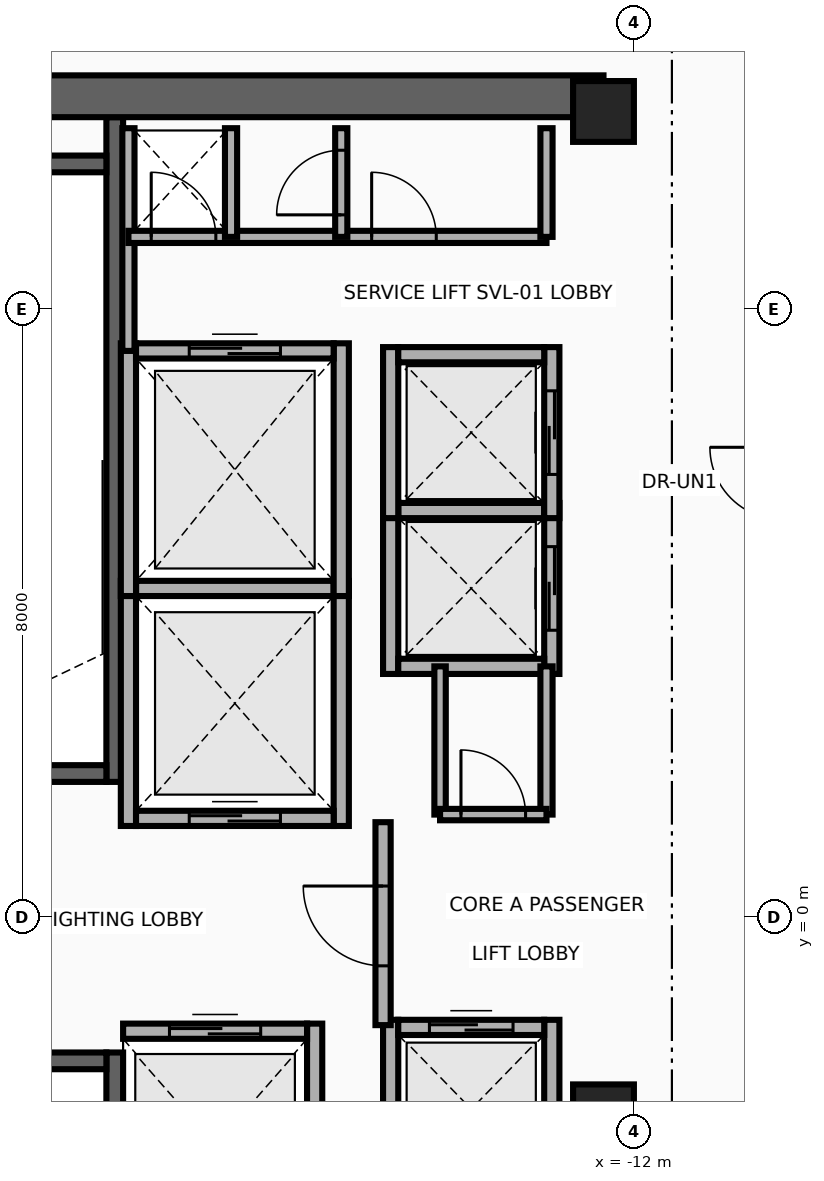
"""IFC4 building model, lengths in metres.
Left out: names, types, materials, properties, quantities, classifications, styles, units other than length and angle.
Written with IfcOpenShell. Run it as: python <this file> out.ifc"""

import sys

from ifc_helpers import new_model, si_unit, direction, frame, frame_2d, origin, origin_2d, place, context, subcontext, project, spatial, rectangle, extrude, source, transform, mapped, element, fill, save


model = new_model("IFC4")
c1 = context("Model", 3, precision=1e-05, world=origin(), true_north=direction((0.0, 1.0)))
c2 = subcontext(c1, "Body", "Model", "MODEL_VIEW")
j1 = project(units=[si_unit("LENGTHUNIT", "METRE"), si_unit("PLANEANGLEUNIT", "RADIAN")], contexts=[c1])
p1 = place(None, origin())
s1 = spatial("IfcSite", under=j1, at=p1, CompositionType="ELEMENT")
p2 = place(p1, origin())
s2 = spatial("IfcBuilding", under=s1, at=p2, CompositionType="ELEMENT")
p3 = place(p2, frame((0.0, 0.0, 269.5)))
s3 = spatial("IfcBuildingStorey", under=s2, at=p3, CompositionType="ELEMENT", Elevation=269.5)
p4 = place(p3, frame((-18.83, 1.78, 0.0), z_axis=(0.0, 0.0, 1.0), x_axis=(0.0, 1.0, 0.0)))
e1 = element("IfcWall", 1, at=p4, inside=s3, PredefinedType="SHEAR", context=c2, shape_type="SweptSolid", body=[
    extrude(rectangle(XDim=8.745, YDim=0.22, at=frame_2d((4.373, 0.0))), origin(), (0.0, 0.0, 1.0), 3.26),
])
p5 = place(p3, frame((-22.05, 1.89, 0.0), z_axis=(0.0, 0.0, 1.0), x_axis=(1.0, 0.0, 0.0)))
e2 = element("IfcWall", 2, at=p5, inside=s3, PredefinedType="SHEAR", context=c2, shape_type="SweptSolid", body=[
    extrude(rectangle(XDim=3.11, YDim=0.22, at=frame_2d((1.555, 0.0))), origin(), (0.0, 0.0, 1.0), 3.26),
])
p6 = place(p5, frame((1.0, 0.0, 0.0)))
e3 = element("IfcOpeningElement", 3, at=p6, cuts=e2, PredefinedType="OPENING", context=c2, shape_type="SweptSolid", body=[
    extrude(rectangle(XDim=1.1, YDim=2.15, at=frame_2d((0.55, 1.075))), frame((0.0, 0.125, 0.0), z_axis=(0.0, -1.0, 0.0), x_axis=(1.0, 0.0, 0.0)), (0.0, 0.0, 1.0), 0.25),
])
p7 = place(p3, frame((-22.05, 9.91, 0.0), z_axis=(0.0, 0.0, 1.0), x_axis=(1.0, 0.0, 0.0)))
e4 = element("IfcWall", 4, at=p7, inside=s3, PredefinedType="SHEAR", context=c2, shape_type="SweptSolid", body=[
    extrude(rectangle(XDim=3.11, YDim=0.22, at=frame_2d((1.555, 0.0))), origin(), (0.0, 0.0, 1.0), 3.26),
])
p8 = place(p3, frame((-18.83, -10.525, 0.0), z_axis=(0.0, 0.0, 1.0), x_axis=(0.0, 1.0, 0.0)))
e5 = element("IfcWall", 5, at=p8, inside=s3, PredefinedType="SHEAR", context=c2, shape_type="SweptSolid", body=[
    extrude(rectangle(XDim=8.745, YDim=0.22, at=frame_2d((4.373, 0.0))), origin(), (0.0, 0.0, 1.0), 3.26),
])
p9 = place(p3, frame((-22.05, -1.89, 0.0), z_axis=(0.0, 0.0, 1.0), x_axis=(1.0, 0.0, 0.0)))
e6 = element("IfcWall", 6, at=p9, inside=s3, PredefinedType="SHEAR", context=c2, shape_type="SweptSolid", body=[
    extrude(rectangle(XDim=3.11, YDim=0.22, at=frame_2d((1.555, 0.0))), origin(), (0.0, 0.0, 1.0), 3.26),
])
p10 = place(p9, frame((1.0, 0.0, 0.0)))
e7 = element("IfcOpeningElement", 7, at=p10, cuts=e6, PredefinedType="OPENING", context=c2, shape_type="SweptSolid", body=[
    extrude(rectangle(XDim=1.1, YDim=2.15, at=frame_2d((0.55, 1.075))), frame((0.0, 0.125, 0.0), z_axis=(0.0, -1.0, 0.0), x_axis=(1.0, 0.0, 0.0)), (0.0, 0.0, 1.0), 0.25),
])
p11 = place(p3, frame((-22.65, 10.8, 0.0), z_axis=(0.0, 0.0, 1.0), x_axis=(1.0, 0.0, 0.0)))
e8 = element("IfcWall", 8, at=p11, inside=s3, PredefinedType="SHEAR", context=c2, shape_type="SweptSolid", body=[
    extrude(rectangle(XDim=10.25, YDim=0.55, at=frame_2d((5.125, 0.0))), origin(), (0.0, 0.0, 1.0), 3.26),
])
m1 = source(origin(), c2, "Body", "SweptSolid", [
    extrude(rectangle(XDim=0.8, YDim=0.8, at=origin_2d()), origin(), (0.0, 0.0, 1.0), 3.5),
])
for number, where, z_axis, x_axis in (
    (9, (-12.4, -2.6, 0.0), (0.0, 0.0, 1.0), (1.0, 0.0, 0.0)),
    (10, (-12.4, 10.6, 0.0), (0.0, 0.0, 1.0), (1.0, 0.0, 0.0)),
):
    element("IfcColumn", number, at=place(p3, frame(where, z_axis=z_axis, x_axis=x_axis)), inside=s3, PredefinedType="COLUMN", context=c2, shape_type="MappedRepresentation", body=[
        mapped(m1, transform((0.0, 0.0, 0.0), x_axis=(1.0, 0.0, 0.0), y_axis=(0.0, 1.0, 0.0), z_axis=(0.0, 0.0, 1.0), scale=1.0)),
    ])
for number, where, z_axis, x_axis in (
    (11, (-18.65, 1.2, 0.0), (0.0, 0.0, 1.0), (0.0, 1.0, 0.0)),
    (12, (-15.85, 1.2, 0.0), (0.0, 0.0, 1.0), (0.0, 1.0, 0.0)),
):
    element("IfcWall", number, at=place(p3, frame(where, z_axis=z_axis, x_axis=x_axis)), inside=s3, PredefinedType="MOVABLE", context=c2, shape_type="SweptSolid", body=[
        extrude(rectangle(XDim=3.225, YDim=0.2, at=frame_2d((1.613, 0.0))), origin(), (0.0, 0.0, 1.0), 3.26),
    ])
p12 = place(p3, frame((-18.55, 1.3, 0.0), z_axis=(0.0, 0.0, 1.0), x_axis=(1.0, 0.0, 0.0)))
e13 = element("IfcWall", 13, at=p12, inside=s3, PredefinedType="MOVABLE", context=c2, shape_type="SweptSolid", body=[
    extrude(rectangle(XDim=2.6, YDim=0.2, at=frame_2d((1.3, 0.0))), origin(), (0.0, 0.0, 1.0), 3.26),
])
p13 = place(p12, frame((0.7, 0.0, 0.0)))
e14 = element("IfcOpeningElement", 14, at=p13, cuts=e13, PredefinedType="OPENING", context=c2, shape_type="SweptSolid", body=[
    extrude(rectangle(XDim=1.2, YDim=2.1, at=frame_2d((0.6, 1.05))), frame((0.0, 0.115, 0.0), z_axis=(0.0, -1.0, 0.0), x_axis=(1.0, 0.0, 0.0)), (0.0, 0.0, 1.0), 0.23),
])
p14 = place(p3, frame((-18.55, 4.325, 0.0), z_axis=(0.0, 0.0, 1.0), x_axis=(1.0, 0.0, 0.0)))
e15 = element("IfcWall", 15, at=p14, inside=s3, PredefinedType="MOVABLE", context=c2, shape_type="SweptSolid", body=[
    extrude(rectangle(XDim=2.6, YDim=0.2, at=frame_2d((1.3, 0.0))), origin(), (0.0, 0.0, 1.0), 3.26),
])
p15 = place(p3, frame((-16.2, -4.6, 0.0), z_axis=(0.0, 0.0, 1.0), x_axis=(0.0, 1.0, 0.0)))
e16 = element("IfcWall", 16, at=p15, inside=s3, PredefinedType="MOVABLE", context=c2, shape_type="SweptSolid", body=[
    extrude(rectangle(XDim=3.2, YDim=0.2, at=frame_2d((1.6, 0.0))), origin(), (0.0, 0.0, 1.0), 3.26),
])
p16 = place(p3, frame((-18.72, -1.5, 0.0), z_axis=(0.0, 0.0, 1.0), x_axis=(1.0, 0.0, 0.0)))
e17 = element("IfcWall", 17, at=p16, inside=s3, PredefinedType="MOVABLE", context=c2, shape_type="SweptSolid", body=[
    extrude(rectangle(XDim=2.42, YDim=0.2, at=frame_2d((1.21, 0.0))), origin(), (0.0, 0.0, 1.0), 3.26),
])
p17 = place(p16, frame((0.61, 0.0, 0.0)))
e18 = element("IfcOpeningElement", 18, at=p17, cuts=e17, PredefinedType="OPENING", context=c2, shape_type="SweptSolid", body=[
    extrude(rectangle(XDim=1.2, YDim=2.1, at=frame_2d((0.6, 1.05))), frame((0.0, 0.115, 0.0), z_axis=(0.0, -1.0, 0.0), x_axis=(1.0, 0.0, 0.0)), (0.0, 0.0, 1.0), 0.23),
])
for number, where, z_axis, x_axis in (
    (19, (-18.65, 4.225, 0.0), (0.0, 0.0, 1.0), (0.0, 1.0, 0.0)),
    (20, (-15.85, 4.225, 0.0), (0.0, 0.0, 1.0), (0.0, 1.0, 0.0)),
):
    element("IfcWall", number, at=place(p3, frame(where, z_axis=z_axis, x_axis=x_axis)), inside=s3, PredefinedType="MOVABLE", context=c2, shape_type="SweptSolid", body=[
        extrude(rectangle(XDim=3.325, YDim=0.2, at=frame_2d((1.663, 0.0))), origin(), (0.0, 0.0, 1.0), 3.26),
    ])
p18 = place(p3, frame((-18.55, 7.45, 0.0), z_axis=(0.0, 0.0, 1.0), x_axis=(1.0, 0.0, 0.0)))
e21 = element("IfcWall", 21, at=p18, inside=s3, PredefinedType="MOVABLE", context=c2, shape_type="SweptSolid", body=[
    extrude(rectangle(XDim=2.6, YDim=0.2, at=frame_2d((1.3, 0.0))), origin(), (0.0, 0.0, 1.0), 3.26),
])
p19 = place(p18, frame((0.7, 0.0, 0.0)))
e22 = element("IfcOpeningElement", 22, at=p19, cuts=e21, PredefinedType="OPENING", context=c2, shape_type="SweptSolid", body=[
    extrude(rectangle(XDim=1.2, YDim=2.1, at=frame_2d((0.6, 1.05))), frame((0.0, 0.115, 0.0), z_axis=(0.0, -1.0, 0.0), x_axis=(1.0, 0.0, 0.0)), (0.0, 0.0, 1.0), 0.23),
])
p20 = place(p3, frame((-15.2, 3.2, 0.0), z_axis=(0.0, 0.0, 1.0), x_axis=(0.0, 1.0, 0.0)))
e23 = element("IfcWall", 23, at=p20, inside=s3, PredefinedType="MOVABLE", context=c2, shape_type="SweptSolid", body=[
    extrude(rectangle(XDim=2.25, YDim=0.2, at=frame_2d((1.125, 0.0))), origin(), (0.0, 0.0, 1.0), 3.26),
])
p21 = place(p3, frame((-13.08, 3.2, 0.0), z_axis=(0.0, 0.0, 1.0), x_axis=(0.0, 1.0, 0.0)))
e24 = element("IfcWall", 24, at=p21, inside=s3, PredefinedType="MOVABLE", context=c2, shape_type="SweptSolid", body=[
    extrude(rectangle(XDim=2.25, YDim=0.2, at=frame_2d((1.125, 0.0))), origin(), (0.0, 0.0, 1.0), 3.26),
])
p22 = place(p21, frame((0.575, 0.0, 0.0)))
e25 = element("IfcOpeningElement", 25, at=p22, cuts=e24, PredefinedType="OPENING", context=c2, shape_type="SweptSolid", body=[
    extrude(rectangle(XDim=1.1, YDim=2.1, at=frame_2d((0.55, 1.05))), frame((0.0, 0.115, 0.0), z_axis=(0.0, -1.0, 0.0), x_axis=(1.0, 0.0, 0.0)), (0.0, 0.0, 1.0), 0.23),
])
for number, where, z_axis, x_axis in (
    (26, (-15.1, 3.3, 0.0), (0.0, 0.0, 1.0), (1.0, 0.0, 0.0)),
    (27, (-15.1, 5.35, 0.0), (0.0, 0.0, 1.0), (1.0, 0.0, 0.0)),
):
    element("IfcWall", number, at=place(p3, frame(where, z_axis=z_axis, x_axis=x_axis)), inside=s3, PredefinedType="MOVABLE", context=c2, shape_type="SweptSolid", body=[
        extrude(rectangle(XDim=1.92, YDim=0.2, at=frame_2d((0.96, 0.0))), origin(), (0.0, 0.0, 1.0), 3.26),
    ])
p23 = place(p3, frame((-15.2, 5.25, 0.0), z_axis=(0.0, 0.0, 1.0), x_axis=(0.0, 1.0, 0.0)))
e28 = element("IfcWall", 28, at=p23, inside=s3, PredefinedType="MOVABLE", context=c2, shape_type="SweptSolid", body=[
    extrude(rectangle(XDim=2.25, YDim=0.2, at=frame_2d((1.125, 0.0))), origin(), (0.0, 0.0, 1.0), 3.26),
])
p24 = place(p3, frame((-13.08, 5.25, 0.0), z_axis=(0.0, 0.0, 1.0), x_axis=(0.0, 1.0, 0.0)))
e29 = element("IfcWall", 29, at=p24, inside=s3, PredefinedType="MOVABLE", context=c2, shape_type="SweptSolid", body=[
    extrude(rectangle(XDim=2.25, YDim=0.2, at=frame_2d((1.125, 0.0))), origin(), (0.0, 0.0, 1.0), 3.26),
])
p25 = place(p24, frame((0.575, 0.0, 0.0)))
e30 = element("IfcOpeningElement", 30, at=p25, cuts=e29, PredefinedType="OPENING", context=c2, shape_type="SweptSolid", body=[
    extrude(rectangle(XDim=1.1, YDim=2.1, at=frame_2d((0.55, 1.05))), frame((0.0, 0.115, 0.0), z_axis=(0.0, -1.0, 0.0), x_axis=(1.0, 0.0, 0.0)), (0.0, 0.0, 1.0), 0.23),
])
p26 = place(p3, frame((-15.1, 7.4, 0.0), z_axis=(0.0, 0.0, 1.0), x_axis=(1.0, 0.0, 0.0)))
e31 = element("IfcWall", 31, at=p26, inside=s3, PredefinedType="MOVABLE", context=c2, shape_type="SweptSolid", body=[
    extrude(rectangle(XDim=1.92, YDim=0.2, at=frame_2d((0.96, 0.0))), origin(), (0.0, 0.0, 1.0), 3.26),
])
for number, where, z_axis, x_axis in (
    (32, (-15.2, -3.7, 0.0), (0.0, 0.0, 1.0), (0.0, 1.0, 0.0)),
    (33, (-13.08, -3.7, 0.0), (0.0, 0.0, 1.0), (0.0, 1.0, 0.0)),
):
    element("IfcWall", number, at=place(p3, frame(where, z_axis=z_axis, x_axis=x_axis)), inside=s3, PredefinedType="MOVABLE", context=c2, shape_type="SweptSolid", body=[
        extrude(rectangle(XDim=2.35, YDim=0.2, at=frame_2d((1.175, 0.0))), origin(), (0.0, 0.0, 1.0), 3.26),
    ])
p27 = place(p3, frame((-15.1, -1.45, 0.0), z_axis=(0.0, 0.0, 1.0), x_axis=(1.0, 0.0, 0.0)))
e34 = element("IfcWall", 34, at=p27, inside=s3, PredefinedType="MOVABLE", context=c2, shape_type="SweptSolid", body=[
    extrude(rectangle(XDim=1.92, YDim=0.2, at=frame_2d((0.96, 0.0))), origin(), (0.0, 0.0, 1.0), 3.26),
])
p28 = place(p27, frame((0.41, 0.0, 0.0)))
e35 = element("IfcOpeningElement", 35, at=p28, cuts=e34, PredefinedType="OPENING", context=c2, shape_type="SweptSolid", body=[
    extrude(rectangle(XDim=1.1, YDim=2.1, at=frame_2d((0.55, 1.05))), frame((0.0, 0.115, 0.0), z_axis=(0.0, -1.0, 0.0), x_axis=(1.0, 0.0, 0.0)), (0.0, 0.0, 1.0), 0.23),
])
p29 = place(p3, frame((-15.3, -1.42, 0.0), z_axis=(0.0, 0.0, 1.0), x_axis=(0.0, 1.0, 0.0)))
e36 = element("IfcWall", 36, at=p29, inside=s3, PredefinedType="PARTITIONING", context=c2, shape_type="SweptSolid", body=[
    extrude(rectangle(XDim=2.67, YDim=0.2, at=frame_2d((1.335, 0.0))), origin(), (0.0, 0.0, 1.0), 3.26),
])
p30 = place(p29, frame((0.78, 0.0, 0.0)))
e37 = element("IfcOpeningElement", 37, at=p30, cuts=e36, PredefinedType="OPENING", context=c2, shape_type="SweptSolid", body=[
    extrude(rectangle(XDim=1.05, YDim=2.15, at=frame_2d((0.525, 1.075))), frame((0.0, 0.115, 0.0), z_axis=(0.0, -1.0, 0.0), x_axis=(1.0, 0.0, 0.0)), (0.0, 0.0, 1.0), 0.23),
])
p31 = place(p3, frame((-18.65, 7.45, 0.0), z_axis=(0.0, 0.0, 1.0), x_axis=(0.0, 1.0, 0.0)))
e38 = element("IfcWall", 38, at=p31, inside=s3, PredefinedType="PARTITIONING", context=c2, shape_type="SweptSolid", body=[
    extrude(rectangle(XDim=2.93, YDim=0.16, at=frame_2d((1.465, 0.0))), origin(), (0.0, 0.0, 1.0), 3.26),
])
p32 = place(p3, frame((-18.65, 8.95, 0.0), z_axis=(0.0, 0.0, 1.0), x_axis=(1.0, 0.0, 0.0)))
e39 = element("IfcWall", 39, at=p32, inside=s3, PredefinedType="PARTITIONING", context=c2, shape_type="SweptSolid", body=[
    extrude(rectangle(XDim=5.5, YDim=0.16, at=frame_2d((2.75, 0.0))), origin(), (0.0, 0.0, 1.0), 3.26),
])
p33 = place(p32, frame((0.3, 0.0, 0.0)))
e40 = element("IfcOpeningElement", 40, at=p33, cuts=e39, PredefinedType="OPENING", context=c2, shape_type="SweptSolid", body=[
    extrude(rectangle(XDim=0.85, YDim=2.05, at=frame_2d((0.425, 1.025))), frame((0.0, 0.095, 0.0), z_axis=(0.0, -1.0, 0.0), x_axis=(1.0, 0.0, 0.0)), (0.0, 0.0, 1.0), 0.19),
])
p34 = place(p32, frame((3.2, 0.0, 0.0)))
e41 = element("IfcOpeningElement", 41, at=p34, cuts=e39, PredefinedType="OPENING", context=c2, shape_type="SweptSolid", body=[
    extrude(rectangle(XDim=0.85, YDim=2.05, at=frame_2d((0.425, 1.025))), frame((0.0, 0.095, 0.0), z_axis=(0.0, -1.0, 0.0), x_axis=(1.0, 0.0, 0.0)), (0.0, 0.0, 1.0), 0.19),
])
for number, where, z_axis, x_axis in (
    (42, (-13.15, 8.95, 0.0), (0.0, 0.0, 1.0), (0.0, 1.0, 0.0)),
    (43, (-17.3, 8.95, 0.0), (0.0, 0.0, 1.0), (0.0, 1.0, 0.0)),
):
    element("IfcWall", number, at=place(p3, frame(where, z_axis=z_axis, x_axis=x_axis)), inside=s3, PredefinedType="PARTITIONING", context=c2, shape_type="SweptSolid", body=[
        extrude(rectangle(XDim=1.43, YDim=0.16, at=frame_2d((0.715, 0.0))), origin(), (0.0, 0.0, 1.0), 3.26),
    ])
p35 = place(p3, frame((-15.85, 8.95, 0.0), z_axis=(0.0, 0.0, 1.0), x_axis=(0.0, 1.0, 0.0)))
e44 = element("IfcWall", 44, at=p35, inside=s3, PredefinedType="PARTITIONING", context=c2, shape_type="SweptSolid", body=[
    extrude(rectangle(XDim=1.43, YDim=0.16, at=frame_2d((0.715, 0.0))), origin(), (0.0, 0.0, 1.0), 3.26),
])
p36 = place(p35, frame((0.29, 0.0, 0.0)))
e45 = element("IfcOpeningElement", 45, at=p36, cuts=e44, PredefinedType="OPENING", context=c2, shape_type="SweptSolid", body=[
    extrude(rectangle(XDim=0.85, YDim=2.05, at=frame_2d((0.425, 1.025))), frame((0.0, 0.095, 0.0), z_axis=(0.0, -1.0, 0.0), x_axis=(1.0, 0.0, 0.0)), (0.0, 0.0, 1.0), 0.19),
])
p37 = place(p3, frame((-13.15, 1.35, 0.0), z_axis=(0.0, 0.0, 1.0), x_axis=(0.0, 1.0, 0.0)))
e46 = element("IfcWall", 46, at=p37, inside=s3, PredefinedType="PARTITIONING", context=c2, shape_type="SweptSolid", body=[
    extrude(rectangle(XDim=1.95, YDim=0.16, at=frame_2d((0.975, 0.0))), origin(), (0.0, 0.0, 1.0), 3.26),
])
p38 = place(p3, frame((-14.55, 1.35, 0.0), z_axis=(0.0, 0.0, 1.0), x_axis=(0.0, 1.0, 0.0)))
e47 = element("IfcWall", 47, at=p38, inside=s3, PredefinedType="PARTITIONING", context=c2, shape_type="SweptSolid", body=[
    extrude(rectangle(XDim=1.95, YDim=0.15, at=frame_2d((0.975, 0.0))), origin(), (0.0, 0.0, 1.0), 3.26),
])
p39 = place(p3, frame((-14.55, 1.35, 0.0), z_axis=(0.0, 0.0, 1.0), x_axis=(1.0, 0.0, 0.0)))
e48 = element("IfcWall", 48, at=p39, inside=s3, PredefinedType="PARTITIONING", context=c2, shape_type="SweptSolid", body=[
    extrude(rectangle(XDim=1.4, YDim=0.15, at=frame_2d((0.7, 0.0))), origin(), (0.0, 0.0, 1.0), 3.26),
])
p40 = place(p39, frame((0.275, 0.0, 0.0)))
e49 = element("IfcOpeningElement", 49, at=p40, cuts=e48, PredefinedType="OPENING", context=c2, shape_type="SweptSolid", body=[
    extrude(rectangle(XDim=0.85, YDim=2.05, at=frame_2d((0.425, 1.025))), frame((0.0, 0.09, 0.0), z_axis=(0.0, -1.0, 0.0), x_axis=(1.0, 0.0, 0.0)), (0.0, 0.0, 1.0), 0.18),
])
p41 = place(p13, origin())
e50 = element("IfcDoor", 50, at=p41, inside=s3, OperationType="DOUBLE_DOOR_SLIDING", PredefinedType="DOOR", context=c2, shape_type="SweptSolid", body=[
    extrude(rectangle(XDim=1.2, YDim=2.1, at=frame_2d((0.6, 1.05))), frame((0.0, 0.025, 0.0), z_axis=(0.0, -1.0, 0.0), x_axis=(1.0, 0.0, 0.0)), (0.0, 0.0, 1.0), 0.05),
])
fill(e14, e50)
p42 = place(p17, origin())
e51 = element("IfcDoor", 51, at=p42, inside=s3, OperationType="DOUBLE_DOOR_SLIDING", PredefinedType="DOOR", context=c2, shape_type="SweptSolid", body=[
    extrude(rectangle(XDim=1.2, YDim=2.1, at=frame_2d((0.6, 1.05))), frame((0.0, 0.025, 0.0), z_axis=(0.0, -1.0, 0.0), x_axis=(1.0, 0.0, 0.0)), (0.0, 0.0, 1.0), 0.05),
])
fill(e18, e51)
p43 = place(p19, origin())
e52 = element("IfcDoor", 52, at=p43, inside=s3, OperationType="DOUBLE_DOOR_SLIDING", PredefinedType="DOOR", context=c2, shape_type="SweptSolid", body=[
    extrude(rectangle(XDim=1.2, YDim=2.1, at=frame_2d((0.6, 1.05))), frame((0.0, 0.025, 0.0), z_axis=(0.0, -1.0, 0.0), x_axis=(1.0, 0.0, 0.0)), (0.0, 0.0, 1.0), 0.05),
])
fill(e22, e52)
p44 = place(p22, origin())
e53 = element("IfcDoor", 53, at=p44, inside=s3, OperationType="DOUBLE_DOOR_SLIDING", PredefinedType="DOOR", context=c2, shape_type="SweptSolid", body=[
    extrude(rectangle(XDim=1.1, YDim=2.1, at=frame_2d((0.55, 1.05))), frame((0.0, 0.025, 0.0), z_axis=(0.0, -1.0, 0.0), x_axis=(1.0, 0.0, 0.0)), (0.0, 0.0, 1.0), 0.05),
])
fill(e25, e53)
p45 = place(p25, origin())
e54 = element("IfcDoor", 54, at=p45, inside=s3, OperationType="DOUBLE_DOOR_SLIDING", PredefinedType="DOOR", context=c2, shape_type="SweptSolid", body=[
    extrude(rectangle(XDim=1.1, YDim=2.1, at=frame_2d((0.55, 1.05))), frame((0.0, 0.025, 0.0), z_axis=(0.0, -1.0, 0.0), x_axis=(1.0, 0.0, 0.0)), (0.0, 0.0, 1.0), 0.05),
])
fill(e30, e54)
p46 = place(p28, origin())
e55 = element("IfcDoor", 55, at=p46, inside=s3, OperationType="DOUBLE_DOOR_SLIDING", PredefinedType="DOOR", context=c2, shape_type="SweptSolid", body=[
    extrude(rectangle(XDim=1.1, YDim=2.1, at=frame_2d((0.55, 1.05))), frame((0.0, 0.025, 0.0), z_axis=(0.0, -1.0, 0.0), x_axis=(1.0, 0.0, 0.0)), (0.0, 0.0, 1.0), 0.05),
])
fill(e35, e55)
p47 = place(p30, origin())
e56 = element("IfcDoor", 56, at=p47, inside=s3, OperationType="SINGLE_SWING_RIGHT", PredefinedType="DOOR", context=c2, shape_type="SweptSolid", body=[
    extrude(rectangle(XDim=1.05, YDim=2.15, at=frame_2d((0.525, 1.075))), frame((0.0, 0.025, 0.0), z_axis=(0.0, -1.0, 0.0), x_axis=(1.0, 0.0, 0.0)), (0.0, 0.0, 1.0), 0.05),
])
fill(e37, e56)
p48 = place(p33, origin())
e57 = element("IfcDoor", 57, at=p48, inside=s3, OperationType="SINGLE_SWING_LEFT", PredefinedType="DOOR", context=c2, shape_type="SweptSolid", body=[
    extrude(rectangle(XDim=0.85, YDim=2.05, at=frame_2d((0.425, 1.025))), frame((0.0, 0.025, 0.0), z_axis=(0.0, -1.0, 0.0), x_axis=(1.0, 0.0, 0.0)), (0.0, 0.0, 1.0), 0.05),
])
fill(e40, e57)
p49 = place(p34, origin())
e58 = element("IfcDoor", 58, at=p49, inside=s3, OperationType="SINGLE_SWING_RIGHT", PredefinedType="DOOR", context=c2, shape_type="SweptSolid", body=[
    extrude(rectangle(XDim=0.85, YDim=2.05, at=frame_2d((0.425, 1.025))), frame((0.0, 0.025, 0.0), z_axis=(0.0, -1.0, 0.0), x_axis=(1.0, 0.0, 0.0)), (0.0, 0.0, 1.0), 0.05),
])
fill(e41, e58)
p50 = place(p36, origin())
e59 = element("IfcDoor", 59, at=p50, inside=s3, OperationType="SINGLE_SWING_LEFT", PredefinedType="DOOR", context=c2, shape_type="SweptSolid", body=[
    extrude(rectangle(XDim=0.85, YDim=2.05, at=frame_2d((0.425, 1.025))), frame((0.0, 0.025, 0.0), z_axis=(0.0, -1.0, 0.0), x_axis=(1.0, 0.0, 0.0)), (0.0, 0.0, 1.0), 0.05),
])
fill(e45, e59)
p51 = place(p40, origin())
e60 = element("IfcDoor", 60, at=p51, inside=s3, OperationType="SINGLE_SWING_RIGHT", PredefinedType="DOOR", context=c2, shape_type="SweptSolid", body=[
    extrude(rectangle(XDim=0.85, YDim=2.05, at=frame_2d((0.425, 1.025))), frame((0.0, 0.025, 0.0), z_axis=(0.0, -1.0, 0.0), x_axis=(1.0, 0.0, 0.0)), (0.0, 0.0, 1.0), 0.05),
])
fill(e49, e60)
save(model, sys.argv[1])
